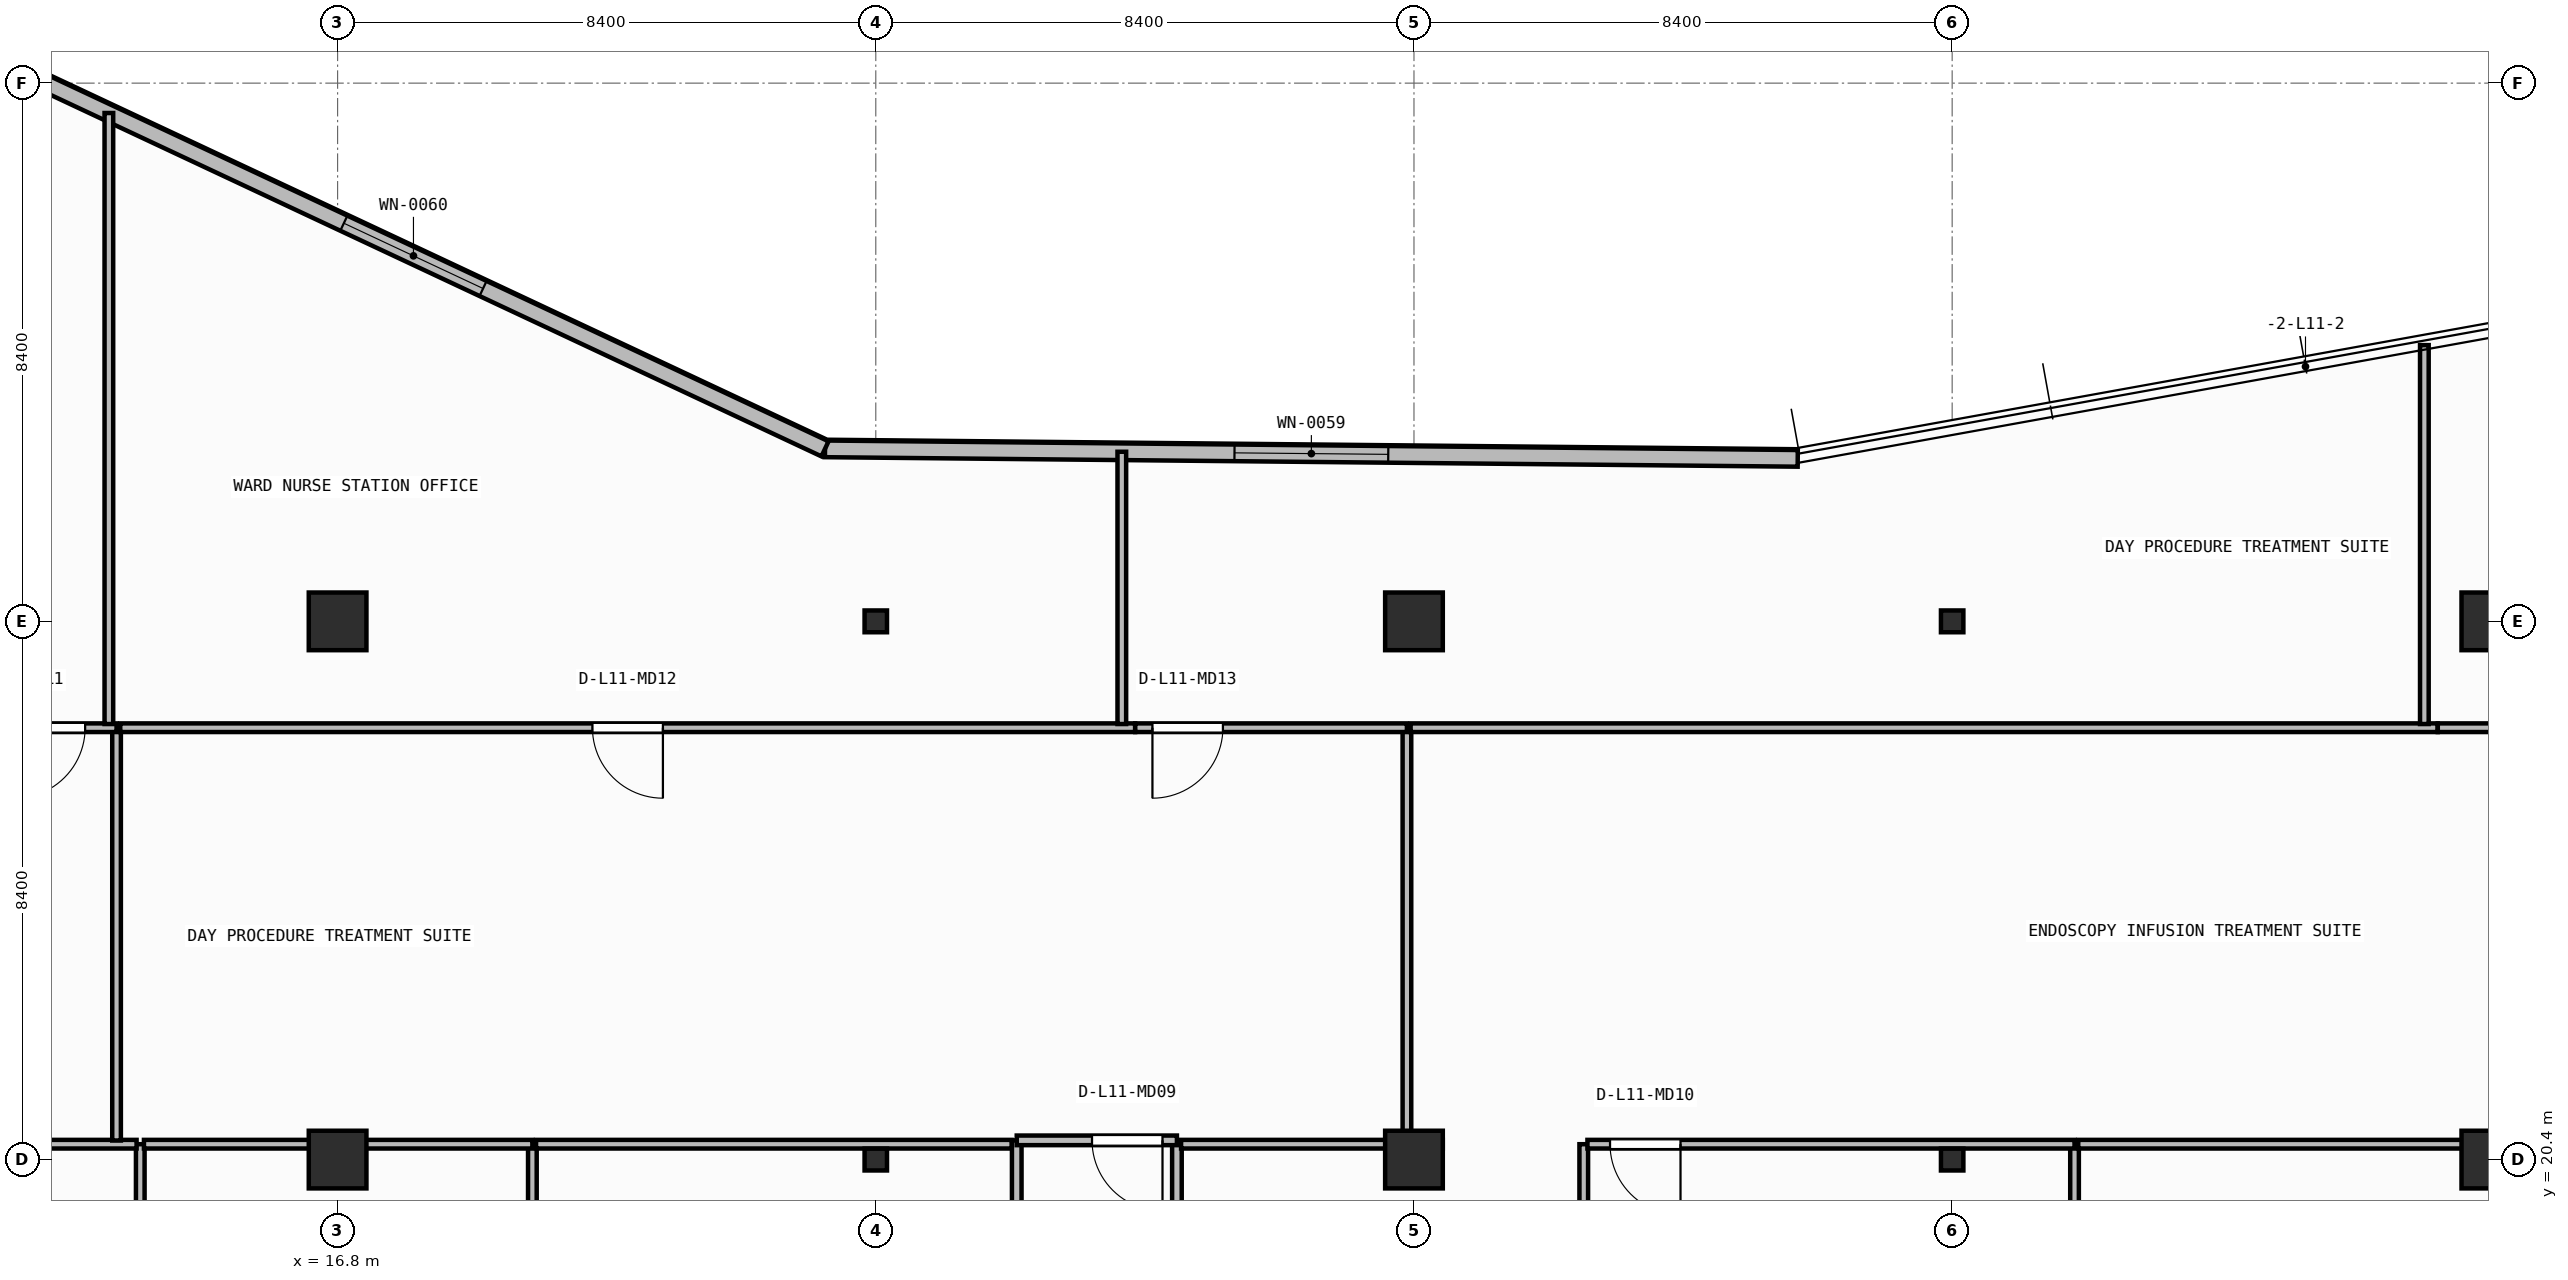
"""IFC4 building model, lengths in metres.
Left out: names, types, materials, properties, quantities, classifications, styles, units other than length and angle.
Written with IfcOpenShell. Run it as: python <this file> out.ifc"""

import sys

from ifc_helpers import new_model, si_unit, direction, frame, frame_2d, origin, origin_2d, place, context, subcontext, project, spatial, rectangle, i_section, extrude, element, fill, save


model = new_model("IFC4")
c1 = context("Model", 3, precision=1e-05, world=origin(), true_north=direction((0.0, 1.0)))
c2 = subcontext(c1, "Body", "Model", "MODEL_VIEW")
j1 = project(units=[si_unit("LENGTHUNIT", "METRE"), si_unit("PLANEANGLEUNIT", "RADIAN")], contexts=[c1])
p1 = place(None, origin())
s1 = spatial("IfcSite", under=j1, at=p1, CompositionType="ELEMENT")
p2 = place(p1, origin())
s2 = spatial("IfcBuilding", under=s1, at=p2, CompositionType="ELEMENT")
p3 = place(p2, frame((0.0, 0.0, 46.2)))
s3 = spatial("IfcBuildingStorey", under=s2, at=p3, CompositionType="ELEMENT", Elevation=46.2)
p4 = place(p3, frame((16.8, 20.4, 0.0), z_axis=(0.0, 0.0, 1.0), x_axis=(1.0, 0.0, 0.0)))
e1 = element("IfcColumn", 1, at=p4, inside=s3, PredefinedType="COLUMN", context=c2, shape_type="SweptSolid", body=[
    extrude(rectangle(XDim=0.9, YDim=0.9, at=origin_2d()), origin(), (0.0, 0.0, 1.0), 3.95),
])
p5 = place(p3, frame((25.2, 20.4, 0.0), z_axis=(0.0, 0.0, 1.0), x_axis=(1.0, 0.0, 0.0)))
e2 = element("IfcColumn", 2, at=p5, inside=s3, PredefinedType="COLUMN", context=c2, shape_type="SweptSolid", body=[
    extrude(i_section(OverallWidth=0.35, OverallDepth=0.34, WebThickness=0.016, FlangeThickness=0.028, at=origin_2d()), origin(), (0.0, 0.0, 1.0), 3.95),
])
p6 = place(p3, frame((33.6, 20.4, 0.0), z_axis=(0.0, 0.0, 1.0), x_axis=(1.0, 0.0, 0.0)))
e3 = element("IfcColumn", 3, at=p6, inside=s3, PredefinedType="COLUMN", context=c2, shape_type="SweptSolid", body=[
    extrude(rectangle(XDim=0.9, YDim=0.9, at=origin_2d()), origin(), (0.0, 0.0, 1.0), 3.95),
])
p7 = place(p3, frame((42.0, 20.4, 0.0), z_axis=(0.0, 0.0, 1.0), x_axis=(1.0, 0.0, 0.0)))
e4 = element("IfcColumn", 4, at=p7, inside=s3, PredefinedType="COLUMN", context=c2, shape_type="SweptSolid", body=[
    extrude(i_section(OverallWidth=0.35, OverallDepth=0.34, WebThickness=0.016, FlangeThickness=0.028, at=origin_2d()), origin(), (0.0, 0.0, 1.0), 3.95),
])
for number, where, z_axis, x_axis in (
    (5, (50.4, 20.4, 0.0), (0.0, 0.0, 1.0), (1.0, 0.0, 0.0)),
    (6, (16.8, 28.8, 0.0), (0.0, 0.0, 1.0), (1.0, 0.0, 0.0)),
):
    element("IfcColumn", number, at=place(p3, frame(where, z_axis=z_axis, x_axis=x_axis)), inside=s3, PredefinedType="COLUMN", context=c2, shape_type="SweptSolid", body=[
        extrude(rectangle(XDim=0.9, YDim=0.9, at=origin_2d()), origin(), (0.0, 0.0, 1.0), 3.95),
    ])
p8 = place(p3, frame((25.2, 28.8, 0.0), z_axis=(0.0, 0.0, 1.0), x_axis=(1.0, 0.0, 0.0)))
e7 = element("IfcColumn", 7, at=p8, inside=s3, PredefinedType="COLUMN", context=c2, shape_type="SweptSolid", body=[
    extrude(i_section(OverallWidth=0.35, OverallDepth=0.34, WebThickness=0.016, FlangeThickness=0.028, at=origin_2d()), origin(), (0.0, 0.0, 1.0), 3.95),
])
p9 = place(p3, frame((33.6, 28.8, 0.0), z_axis=(0.0, 0.0, 1.0), x_axis=(1.0, 0.0, 0.0)))
e8 = element("IfcColumn", 8, at=p9, inside=s3, PredefinedType="COLUMN", context=c2, shape_type="SweptSolid", body=[
    extrude(rectangle(XDim=0.9, YDim=0.9, at=origin_2d()), origin(), (0.0, 0.0, 1.0), 3.95),
])
p10 = place(p3, frame((42.0, 28.8, 0.0), z_axis=(0.0, 0.0, 1.0), x_axis=(1.0, 0.0, 0.0)))
e9 = element("IfcColumn", 9, at=p10, inside=s3, PredefinedType="COLUMN", context=c2, shape_type="SweptSolid", body=[
    extrude(i_section(OverallWidth=0.35, OverallDepth=0.34, WebThickness=0.016, FlangeThickness=0.028, at=origin_2d()), origin(), (0.0, 0.0, 1.0), 3.95),
])
p11 = place(p3, frame((50.4, 28.8, 0.0), z_axis=(0.0, 0.0, 1.0), x_axis=(1.0, 0.0, 0.0)))
e10 = element("IfcColumn", 10, at=p11, inside=s3, PredefinedType="COLUMN", context=c2, shape_type="SweptSolid", body=[
    extrude(rectangle(XDim=0.9, YDim=0.9, at=origin_2d()), origin(), (0.0, 0.0, 1.0), 3.95),
])
p12 = place(p3, frame((39.59, 31.344, 0.0), z_axis=(0.0, 0.0, 1.0), x_axis=(-0.999952362926, 0.009760731435, 0.0)))
e11 = element("IfcWall", 11, at=p12, inside=s3, PredefinedType="STANDARD", context=c2, shape_type="SweptSolid", body=[
    extrude(rectangle(XDim=15.183, YDim=0.26, at=frame_2d((7.591, 0.0))), origin(), (0.0, 0.0, 1.0), 3.71),
])
p13 = place(p12, frame((6.391, 0.0, 0.9)))
e12 = element("IfcOpeningElement", 12, at=p13, cuts=e11, PredefinedType="OPENING", context=c2, shape_type="SweptSolid", body=[
    extrude(rectangle(XDim=2.4, YDim=1.65, at=frame_2d((1.2, 0.825))), frame((0.0, 0.14, 0.0), z_axis=(0.0, -1.0, 0.0), x_axis=(1.0, 0.0, 0.0)), (0.0, 0.0, 1.0), 0.28),
])
p14 = place(p3, frame((24.408, 31.492, 0.0), z_axis=(0.0, 0.0, 1.0), x_axis=(-0.905396522918, 0.424566998585, 0.0)))
e13 = element("IfcWall", 13, at=p14, inside=s3, PredefinedType="STANDARD", context=c2, shape_type="SweptSolid", body=[
    extrude(rectangle(XDim=14.189, YDim=0.26, at=frame_2d((7.095, 0.0))), origin(), (0.0, 0.0, 1.0), 3.71),
])
p15 = place(p14, frame((5.895, 0.0, 0.9)))
e14 = element("IfcOpeningElement", 14, at=p15, cuts=e13, PredefinedType="OPENING", context=c2, shape_type="SweptSolid", body=[
    extrude(rectangle(XDim=2.4, YDim=1.65, at=frame_2d((1.2, 0.825))), frame((0.0, 0.14, 0.0), z_axis=(0.0, -1.0, 0.0), x_axis=(1.0, 0.0, 0.0)), (0.0, 0.0, 1.0), 0.28),
])
for number, where, z_axis, x_axis in (
    (15, (27.4, 20.7, 0.0), (0.0, 0.0, 1.0), (0.0, -1.0, 0.0)),
    (16, (29.9, 14.7, 0.0), (0.0, 0.0, 1.0), (0.0, 1.0, 0.0)),
):
    element("IfcWall", number, at=place(p3, frame(where, z_axis=z_axis, x_axis=x_axis)), inside=s3, PredefinedType="PARTITIONING", context=c2, shape_type="SweptSolid", body=[
        extrude(rectangle(XDim=6.0, YDim=0.15, at=frame_2d((3.0, 0.0))), origin(), (0.0, 0.0, 1.0), 3.71),
    ])
p16 = place(p3, frame((29.9, 20.7, 0.0), z_axis=(0.0, 0.0, 1.0), x_axis=(-1.0, 0.0, 0.0)))
e17 = element("IfcWall", 17, at=p16, inside=s3, PredefinedType="PARTITIONING", context=c2, shape_type="SweptSolid", body=[
    extrude(rectangle(XDim=2.5, YDim=0.15, at=frame_2d((1.25, 0.0))), origin(), (0.0, 0.0, 1.0), 3.073),
])
p17 = place(p16, frame((0.225, 0.0, 0.0)))
e18 = element("IfcOpeningElement", 18, at=p17, cuts=e17, PredefinedType="OPENING", context=c2, shape_type="SweptSolid", body=[
    extrude(rectangle(XDim=1.1, YDim=2.1, at=frame_2d((0.55, 1.05))), frame((0.0, 0.085, 0.0), z_axis=(0.0, -1.0, 0.0), x_axis=(1.0, 0.0, 0.0)), (0.0, 0.0, 1.0), 0.17),
])
p18 = place(p3, frame((13.72, 14.76, 0.0), z_axis=(0.0, 0.0, 1.0), x_axis=(0.0, 1.0, 0.0)))
e19 = element("IfcWall", 19, at=p18, inside=s3, PredefinedType="PARTITIONING", context=c2, shape_type="SweptSolid", body=[
    extrude(rectangle(XDim=5.88, YDim=0.135, at=frame_2d((2.94, 0.0))), origin(), (0.0, 0.0, 1.0), 3.71),
])
p19 = place(p3, frame((13.663, 20.64, 0.0), z_axis=(0.0, 0.0, 1.0), x_axis=(-1.0, 0.0, 0.0)))
e20 = element("IfcWall", 20, at=p19, inside=s3, PredefinedType="PARTITIONING", context=c2, shape_type="SweptSolid", body=[
    extrude(rectangle(XDim=3.885, YDim=0.135, at=frame_2d((1.942, 0.0))), origin(), (0.0, 0.0, 1.0), 3.073),
])
p20 = place(p3, frame((19.84, 14.76, 0.0), z_axis=(0.0, 0.0, 1.0), x_axis=(0.0, 1.0, 0.0)))
e21 = element("IfcWall", 21, at=p20, inside=s3, PredefinedType="PARTITIONING", context=c2, shape_type="SweptSolid", body=[
    extrude(rectangle(XDim=5.88, YDim=0.135, at=frame_2d((2.94, 0.0))), origin(), (0.0, 0.0, 1.0), 3.71),
])
p21 = place(p3, frame((19.84, 20.64, 0.0), z_axis=(0.0, 0.0, 1.0), x_axis=(-1.0, 0.0, 0.0)))
e22 = element("IfcWall", 22, at=p21, inside=s3, PredefinedType="PARTITIONING", context=c2, shape_type="SweptSolid", body=[
    extrude(rectangle(XDim=6.062, YDim=0.135, at=frame_2d((3.031, 0.0))), origin(), (0.0, 0.0, 1.0), 3.073),
])
p22 = place(p3, frame((27.32, 20.64, 0.0), z_axis=(0.0, 0.0, 1.0), x_axis=(-1.0, 0.0, 0.0)))
e23 = element("IfcWall", 23, at=p22, inside=s3, PredefinedType="PARTITIONING", context=c2, shape_type="SweptSolid", body=[
    extrude(rectangle(XDim=7.423, YDim=0.135, at=frame_2d((3.711, 0.0))), origin(), (0.0, 0.0, 1.0), 3.073),
])
p23 = place(p3, frame((36.25, 14.76, 0.0), z_axis=(0.0, 0.0, 1.0), x_axis=(0.0, 1.0, 0.0)))
e24 = element("IfcWall", 24, at=p23, inside=s3, PredefinedType="PARTITIONING", context=c2, shape_type="SweptSolid", body=[
    extrude(rectangle(XDim=5.88, YDim=0.135, at=frame_2d((2.94, 0.0))), origin(), (0.0, 0.0, 1.0), 3.71),
])
p24 = place(p3, frame((34.05, 20.64, 0.0), z_axis=(0.0, 0.0, 1.0), x_axis=(-1.0, 0.0, 0.0)))
e25 = element("IfcWall", 25, at=p24, inside=s3, PredefinedType="PARTITIONING", context=c2, shape_type="SweptSolid", body=[
    extrude(rectangle(XDim=4.085, YDim=0.135, at=frame_2d((2.042, 0.0))), origin(), (0.0, 0.0, 1.0), 3.073),
])
p25 = place(p3, frame((43.91, 14.76, 0.0), z_axis=(0.0, 0.0, 1.0), x_axis=(0.0, 1.0, 0.0)))
e26 = element("IfcWall", 26, at=p25, inside=s3, PredefinedType="PARTITIONING", context=c2, shape_type="SweptSolid", body=[
    extrude(rectangle(XDim=5.88, YDim=0.135, at=frame_2d((2.94, 0.0))), origin(), (0.0, 0.0, 1.0), 3.71),
])
p26 = place(p3, frame((43.91, 20.64, 0.0), z_axis=(0.0, 0.0, 1.0), x_axis=(-1.0, 0.0, 0.0)))
e27 = element("IfcWall", 27, at=p26, inside=s3, PredefinedType="PARTITIONING", context=c2, shape_type="SweptSolid", body=[
    extrude(rectangle(XDim=7.602, YDim=0.135, at=frame_2d((3.801, 0.0))), origin(), (0.0, 0.0, 1.0), 3.073),
])
p27 = place(p26, frame((6.15, 0.0, 0.0)))
e28 = element("IfcOpeningElement", 28, at=p27, cuts=e27, PredefinedType="OPENING", context=c2, shape_type="SweptSolid", body=[
    extrude(rectangle(XDim=1.1, YDim=2.1, at=frame_2d((0.55, 1.05))), frame((0.0, 0.077, 0.0), z_axis=(0.0, -1.0, 0.0), x_axis=(1.0, 0.0, 0.0)), (0.0, 0.0, 1.0), 0.155),
])
p28 = place(p3, frame((53.76, 20.64, 0.0), z_axis=(0.0, 0.0, 1.0), x_axis=(-1.0, 0.0, 0.0)))
e29 = element("IfcWall", 29, at=p28, inside=s3, PredefinedType="PARTITIONING", context=c2, shape_type="SweptSolid", body=[
    extrude(rectangle(XDim=9.792, YDim=0.135, at=frame_2d((4.896, 0.0))), origin(), (0.0, 0.0, 1.0), 3.073),
])
p29 = place(p3, frame((13.35, 20.698, 0.0), z_axis=(0.0, 0.0, 1.0), x_axis=(0.0, 1.0, 0.0)))
e30 = element("IfcWall", 30, at=p29, inside=s3, PredefinedType="PARTITIONING", context=c2, shape_type="SweptSolid", body=[
    extrude(rectangle(XDim=6.442, YDim=0.135, at=frame_2d((3.221, 0.0))), origin(), (0.0, 0.0, 1.0), 3.71),
])
p30 = place(p3, frame((13.35, 27.14, 0.0), z_axis=(0.0, 0.0, 1.0), x_axis=(-1.0, 0.0, 0.0)))
e31 = element("IfcWall", 31, at=p30, inside=s3, PredefinedType="PARTITIONING", context=c2, shape_type="SweptSolid", body=[
    extrude(rectangle(XDim=13.11, YDim=0.135, at=frame_2d((6.555, 0.0))), origin(), (0.0, 0.0, 1.0), 3.71),
])
p31 = place(p30, frame((0.49, 0.0, 0.0)))
e32 = element("IfcOpeningElement", 32, at=p31, cuts=e31, PredefinedType="OPENING", context=c2, shape_type="SweptSolid", body=[
    extrude(rectangle(XDim=1.1, YDim=2.1, at=frame_2d((0.55, 1.05))), frame((0.0, 0.077, 0.0), z_axis=(0.0, -1.0, 0.0), x_axis=(1.0, 0.0, 0.0)), (0.0, 0.0, 1.0), 0.155),
])
p32 = place(p3, frame((33.49, 20.698, 0.0), z_axis=(0.0, 0.0, 1.0), x_axis=(0.0, 1.0, 0.0)))
e33 = element("IfcWall", 33, at=p32, inside=s3, PredefinedType="PARTITIONING", context=c2, shape_type="SweptSolid", body=[
    extrude(rectangle(XDim=6.442, YDim=0.135, at=frame_2d((3.221, 0.0))), origin(), (0.0, 0.0, 1.0), 3.073),
])
p33 = place(p3, frame((29.248, 27.14, 0.0), z_axis=(0.0, 0.0, 1.0), x_axis=(-1.0, 0.0, 0.0)))
e34 = element("IfcWall", 34, at=p33, inside=s3, PredefinedType="PARTITIONING", context=c2, shape_type="SweptSolid", body=[
    extrude(rectangle(XDim=15.84, YDim=0.135, at=frame_2d((7.92, 0.0))), origin(), (0.0, 0.0, 1.0), 3.71),
])
p34 = place(p33, frame((7.37, 0.0, 0.0)))
e35 = element("IfcOpeningElement", 35, at=p34, cuts=e34, PredefinedType="OPENING", context=c2, shape_type="SweptSolid", body=[
    extrude(rectangle(XDim=1.1, YDim=2.1, at=frame_2d((0.55, 1.05))), frame((0.0, 0.077, 0.0), z_axis=(0.0, -1.0, 0.0), x_axis=(1.0, 0.0, 0.0)), (0.0, 0.0, 1.0), 0.155),
])
p35 = place(p3, frame((33.49, 27.14, 0.0), z_axis=(0.0, 0.0, 1.0), x_axis=(-1.0, 0.0, 0.0)))
e36 = element("IfcWall", 36, at=p35, inside=s3, PredefinedType="PARTITIONING", context=c2, shape_type="SweptSolid", body=[
    extrude(rectangle(XDim=4.24, YDim=0.135, at=frame_2d((2.12, 0.0))), origin(), (0.0, 0.0, 1.0), 3.71),
])
p36 = place(p35, frame((2.872, 0.0, 0.0)))
e37 = element("IfcOpeningElement", 37, at=p36, cuts=e36, PredefinedType="OPENING", context=c2, shape_type="SweptSolid", body=[
    extrude(rectangle(XDim=1.1, YDim=2.1, at=frame_2d((0.55, 1.05))), frame((0.0, 0.077, 0.0), z_axis=(0.0, -1.0, 0.0), x_axis=(1.0, 0.0, 0.0)), (0.0, 0.0, 1.0), 0.155),
])
p37 = place(p3, frame((49.577, 27.14, 0.0), z_axis=(0.0, 0.0, 1.0), x_axis=(-1.0, 0.0, 0.0)))
e38 = element("IfcWall", 38, at=p37, inside=s3, PredefinedType="PARTITIONING", context=c2, shape_type="SweptSolid", body=[
    extrude(rectangle(XDim=16.03, YDim=0.135, at=frame_2d((8.015, 0.0))), origin(), (0.0, 0.0, 1.0), 3.71),
])
p38 = place(p3, frame((58.04, 27.14, 0.0), z_axis=(0.0, 0.0, 1.0), x_axis=(-1.0, 0.0, 0.0)))
e39 = element("IfcWall", 39, at=p38, inside=s3, PredefinedType="PARTITIONING", context=c2, shape_type="SweptSolid", body=[
    extrude(rectangle(XDim=8.46, YDim=0.135, at=frame_2d((4.23, 0.0))), origin(), (0.0, 0.0, 1.0), 3.71),
])
p39 = place(p38, frame((0.374, 0.0, 0.0)))
e40 = element("IfcOpeningElement", 40, at=p39, cuts=e39, PredefinedType="OPENING", context=c2, shape_type="SweptSolid", body=[
    extrude(rectangle(XDim=1.1, YDim=2.1, at=frame_2d((0.55, 1.05))), frame((0.0, 0.077, 0.0), z_axis=(0.0, -1.0, 0.0), x_axis=(1.0, 0.0, 0.0)), (0.0, 0.0, 1.0), 0.155),
])
p40 = place(p3, frame((13.23, 27.198, 0.0), z_axis=(0.0, 0.0, 1.0), x_axis=(0.0, 1.0, 0.0)))
e41 = element("IfcWall", 41, at=p40, inside=s3, PredefinedType="PARTITIONING", context=c2, shape_type="SweptSolid", body=[
    extrude(rectangle(XDim=9.536, YDim=0.135, at=frame_2d((4.768, 0.0))), origin(), (0.0, 0.0, 1.0), 3.71),
])
p41 = place(p3, frame((29.04, 27.198, 0.0), z_axis=(0.0, 0.0, 1.0), x_axis=(0.0, 1.0, 0.0)))
e42 = element("IfcWall", 42, at=p41, inside=s3, PredefinedType="PARTITIONING", context=c2, shape_type="SweptSolid", body=[
    extrude(rectangle(XDim=4.25, YDim=0.135, at=frame_2d((2.125, 0.0))), origin(), (0.0, 0.0, 1.0), 3.71),
])
p42 = place(p3, frame((49.37, 27.198, 0.0), z_axis=(0.0, 0.0, 1.0), x_axis=(0.0, 1.0, 0.0)))
e43 = element("IfcWall", 43, at=p42, inside=s3, PredefinedType="PARTITIONING", context=c2, shape_type="SweptSolid", body=[
    extrude(rectangle(XDim=5.914, YDim=0.135, at=frame_2d((2.957, 0.0))), origin(), (0.0, 0.0, 1.0), 3.71),
])
p43 = place(p13, origin())
e44 = element("IfcWindow", 44, at=p43, inside=s3, PartitioningType="SINGLE_PANEL", PredefinedType="WINDOW", context=c2, shape_type="SweptSolid", body=[
    extrude(rectangle(XDim=2.4, YDim=1.65, at=frame_2d((1.2, 0.825))), frame((0.0, 0.03, 0.0), z_axis=(0.0, -1.0, 0.0), x_axis=(1.0, 0.0, 0.0)), (0.0, 0.0, 1.0), 0.06),
])
fill(e12, e44)
p44 = place(p15, origin())
e45 = element("IfcWindow", 45, at=p44, inside=s3, PartitioningType="SINGLE_PANEL", PredefinedType="WINDOW", context=c2, shape_type="SweptSolid", body=[
    extrude(rectangle(XDim=2.4, YDim=1.65, at=frame_2d((1.2, 0.825))), frame((0.0, 0.03, 0.0), z_axis=(0.0, -1.0, 0.0), x_axis=(1.0, 0.0, 0.0)), (0.0, 0.0, 1.0), 0.06),
])
fill(e14, e45)
p45 = place(p17, origin())
e46 = element("IfcDoor", 46, at=p45, inside=s3, OperationType="SINGLE_SWING_LEFT", PredefinedType="DOOR", context=c2, shape_type="SweptSolid", body=[
    extrude(rectangle(XDim=1.1, YDim=2.1, at=frame_2d((0.55, 1.05))), frame((0.0, 0.025, 0.0), z_axis=(0.0, -1.0, 0.0), x_axis=(1.0, 0.0, 0.0)), (0.0, 0.0, 1.0), 0.05),
])
fill(e18, e46)
p46 = place(p27, origin())
e47 = element("IfcDoor", 47, at=p46, inside=s3, OperationType="SINGLE_SWING_LEFT", PredefinedType="DOOR", context=c2, shape_type="SweptSolid", body=[
    extrude(rectangle(XDim=1.1, YDim=2.1, at=frame_2d((0.55, 1.05))), frame((0.0, 0.025, 0.0), z_axis=(0.0, -1.0, 0.0), x_axis=(1.0, 0.0, 0.0)), (0.0, 0.0, 1.0), 0.05),
])
fill(e28, e47)
p47 = place(p31, origin())
e48 = element("IfcDoor", 48, at=p47, inside=s3, OperationType="SINGLE_SWING_RIGHT", PredefinedType="DOOR", context=c2, shape_type="SweptSolid", body=[
    extrude(rectangle(XDim=1.1, YDim=2.1, at=frame_2d((0.55, 1.05))), frame((0.0, 0.025, 0.0), z_axis=(0.0, -1.0, 0.0), x_axis=(1.0, 0.0, 0.0)), (0.0, 0.0, 1.0), 0.05),
])
fill(e32, e48)
p48 = place(p34, origin())
e49 = element("IfcDoor", 49, at=p48, inside=s3, OperationType="SINGLE_SWING_LEFT", PredefinedType="DOOR", context=c2, shape_type="SweptSolid", body=[
    extrude(rectangle(XDim=1.1, YDim=2.1, at=frame_2d((0.55, 1.05))), frame((0.0, 0.025, 0.0), z_axis=(0.0, -1.0, 0.0), x_axis=(1.0, 0.0, 0.0)), (0.0, 0.0, 1.0), 0.05),
])
fill(e35, e49)
p49 = place(p36, origin())
e50 = element("IfcDoor", 50, at=p49, inside=s3, OperationType="SINGLE_SWING_RIGHT", PredefinedType="DOOR", context=c2, shape_type="SweptSolid", body=[
    extrude(rectangle(XDim=1.1, YDim=2.1, at=frame_2d((0.55, 1.05))), frame((0.0, 0.025, 0.0), z_axis=(0.0, -1.0, 0.0), x_axis=(1.0, 0.0, 0.0)), (0.0, 0.0, 1.0), 0.05),
])
fill(e37, e50)
save(model, sys.argv[1])
